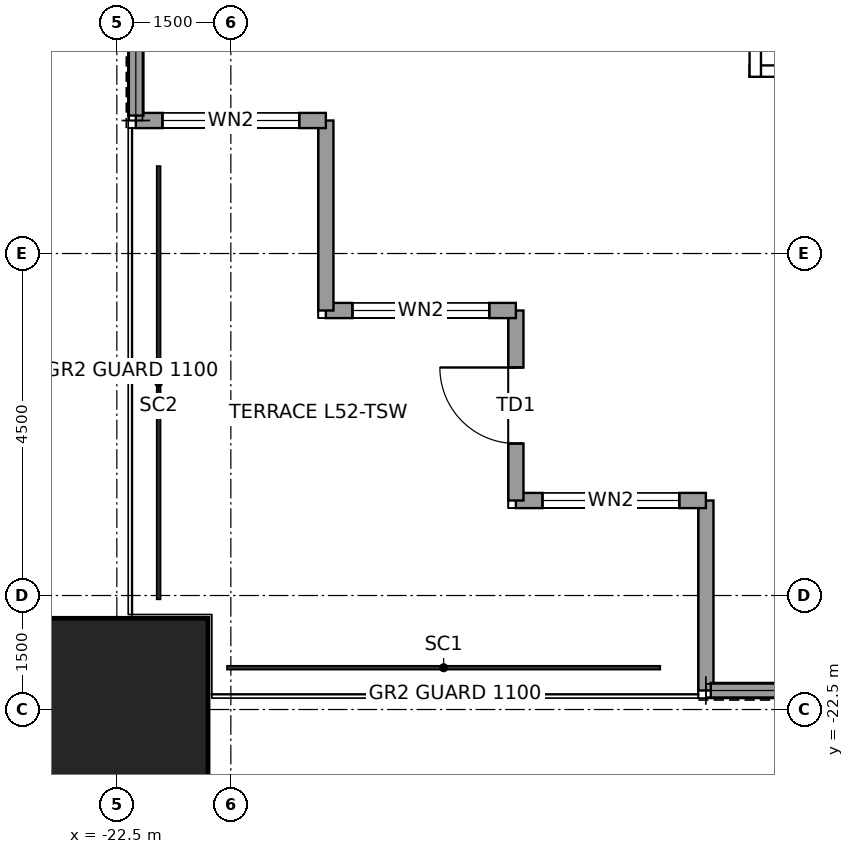
"""IFC4 building model, lengths in metres.
Left out: names, types, materials, properties, quantities, classifications, styles, units other than length and angle.
Written with IfcOpenShell. Run it as: python <this file> out.ifc"""

import sys

from ifc_helpers import new_model, si_unit, direction, frame, frame_2d, origin, origin_2d, place, context, subcontext, project, spatial, rectangle, hollow_rectangle, extrude, element, fill, save


model = new_model("IFC4")
c1 = context("Model", 3, precision=1e-05, world=origin(), true_north=direction((0.0, 1.0)))
c2 = subcontext(c1, "Body", "Model", "MODEL_VIEW")
j1 = project(units=[si_unit("LENGTHUNIT", "METRE"), si_unit("PLANEANGLEUNIT", "RADIAN")], contexts=[c1])
p1 = place(None, origin())
s1 = spatial("IfcSite", under=j1, at=p1, CompositionType="ELEMENT")
p2 = place(p1, origin())
s2 = spatial("IfcBuilding", under=s1, at=p2, CompositionType="ELEMENT")
p3 = place(p2, frame((0.0, 0.0, 241.9)))
s3 = spatial("IfcBuildingStorey", under=s2, at=p3, CompositionType="ELEMENT", Elevation=241.9)
p4 = place(p3, frame((-22.5, -22.5, 0.0), z_axis=(0.0, 0.0, 1.0), x_axis=(1.0, 0.0, 0.0)))
e1 = element("IfcColumn", 1, at=p4, inside=s3, PredefinedType="COLUMN", context=c2, shape_type="SweptSolid", body=[
    extrude(hollow_rectangle(XDim=2.4, YDim=2.4, WallThickness=0.12, at=origin_2d()), origin(), (0.0, 0.0, 1.0), 4.0),
])
p5 = place(p3, frame((-14.75, -22.25, 0.0), z_axis=(0.0, 0.0, 1.0), x_axis=(0.0, 1.0, 0.0)))
e2 = element("IfcWall", 2, at=p5, inside=s3, PredefinedType="SOLIDWALL", context=c2, shape_type="SweptSolid", body=[
    extrude(rectangle(XDim=2.5, YDim=0.2, at=frame_2d((1.25, 0.0))), origin(), (0.0, 0.0, 1.0), 3.85),
])
p6 = place(p3, frame((-14.75, -19.75, 0.0), z_axis=(0.0, 0.0, 1.0), x_axis=(-1.0, 0.0, 0.0)))
e3 = element("IfcWall", 3, at=p6, inside=s3, PredefinedType="SOLIDWALL", context=c2, shape_type="SweptSolid", body=[
    extrude(rectangle(XDim=2.5, YDim=0.2, at=frame_2d((1.25, 0.0))), origin(), (0.0, 0.0, 1.0), 3.85),
])
p7 = place(p6, frame((0.35, 0.0, 0.3)))
e4 = element("IfcOpeningElement", 4, at=p7, cuts=e3, PredefinedType="OPENING", context=c2, shape_type="SweptSolid", body=[
    extrude(rectangle(XDim=1.8, YDim=2.4, at=frame_2d((0.9, 1.2))), frame((0.0, 0.11, 0.0), z_axis=(0.0, -1.0, 0.0), x_axis=(1.0, 0.0, 0.0)), (0.0, 0.0, 1.0), 0.22),
])
p8 = place(p3, frame((-17.25, -19.75, 0.0), z_axis=(0.0, 0.0, 1.0), x_axis=(0.0, 1.0, 0.0)))
e5 = element("IfcWall", 5, at=p8, inside=s3, PredefinedType="SOLIDWALL", context=c2, shape_type="SweptSolid", body=[
    extrude(rectangle(XDim=2.5, YDim=0.2, at=frame_2d((1.25, 0.0))), origin(), (0.0, 0.0, 1.0), 3.85),
])
p9 = place(p8, frame((0.75, 0.0, 0.0)))
e6 = element("IfcOpeningElement", 6, at=p9, cuts=e5, PredefinedType="OPENING", context=c2, shape_type="SweptSolid", body=[
    extrude(rectangle(XDim=1.0, YDim=2.4, at=frame_2d((0.5, 1.2))), frame((0.0, 0.11, 0.0), z_axis=(0.0, -1.0, 0.0), x_axis=(1.0, 0.0, 0.0)), (0.0, 0.0, 1.0), 0.22),
])
p10 = place(p3, frame((-17.25, -17.25, 0.0), z_axis=(0.0, 0.0, 1.0), x_axis=(-1.0, 0.0, 0.0)))
e7 = element("IfcWall", 7, at=p10, inside=s3, PredefinedType="SOLIDWALL", context=c2, shape_type="SweptSolid", body=[
    extrude(rectangle(XDim=2.5, YDim=0.2, at=frame_2d((1.25, 0.0))), origin(), (0.0, 0.0, 1.0), 3.85),
])
p11 = place(p10, frame((0.35, 0.0, 0.3)))
e8 = element("IfcOpeningElement", 8, at=p11, cuts=e7, PredefinedType="OPENING", context=c2, shape_type="SweptSolid", body=[
    extrude(rectangle(XDim=1.8, YDim=2.4, at=frame_2d((0.9, 1.2))), frame((0.0, 0.11, 0.0), z_axis=(0.0, -1.0, 0.0), x_axis=(1.0, 0.0, 0.0)), (0.0, 0.0, 1.0), 0.22),
])
p12 = place(p3, frame((-19.75, -17.25, 0.0), z_axis=(0.0, 0.0, 1.0), x_axis=(0.0, 1.0, 0.0)))
e9 = element("IfcWall", 9, at=p12, inside=s3, PredefinedType="SOLIDWALL", context=c2, shape_type="SweptSolid", body=[
    extrude(rectangle(XDim=2.5, YDim=0.2, at=frame_2d((1.25, 0.0))), origin(), (0.0, 0.0, 1.0), 3.85),
])
p13 = place(p3, frame((-19.75, -14.75, 0.0), z_axis=(0.0, 0.0, 1.0), x_axis=(-1.0, 0.0, 0.0)))
e10 = element("IfcWall", 10, at=p13, inside=s3, PredefinedType="SOLIDWALL", context=c2, shape_type="SweptSolid", body=[
    extrude(rectangle(XDim=2.5, YDim=0.2, at=frame_2d((1.25, 0.0))), origin(), (0.0, 0.0, 1.0), 3.85),
])
p14 = place(p13, frame((0.35, 0.0, 0.3)))
e11 = element("IfcOpeningElement", 11, at=p14, cuts=e10, PredefinedType="OPENING", context=c2, shape_type="SweptSolid", body=[
    extrude(rectangle(XDim=1.8, YDim=2.4, at=frame_2d((0.9, 1.2))), frame((0.0, 0.11, 0.0), z_axis=(0.0, -1.0, 0.0), x_axis=(1.0, 0.0, 0.0)), (0.0, 0.0, 1.0), 0.22),
])
for number, where, z_axis, x_axis in (
    (12, (-12.366, -22.25, 0.0), (0.0, 0.0, 1.0), (-1.0, 0.0, 0.0)),
    (13, (-22.25, -14.685, 0.0), (0.0, 0.0, 1.0), (0.0, 1.0, 0.0)),
):
    element("IfcWall", number, at=place(p3, frame(where, z_axis=z_axis, x_axis=x_axis)), inside=s3, PredefinedType="SOLIDWALL", context=c2, shape_type="SweptSolid", body=[
        extrude(rectangle(XDim=2.319, YDim=0.2, at=frame_2d((1.16, 0.0))), origin(), (0.0, 0.0, 1.0), 3.85),
    ])
p15 = place(p3, frame((-14.175, -14.1, 0.0), z_axis=(0.0, 0.0, 1.0), x_axis=(1.0, 0.0, 0.0)))
e14 = element("IfcWall", 14, at=p15, inside=s3, PredefinedType="PARTITIONING", context=c2, shape_type="SweptSolid", body=[
    extrude(rectangle(XDim=4.333, YDim=0.15, at=frame_2d((2.167, 0.0))), origin(), (0.0, 0.0, 1.0), 3.85),
])
p16 = place(p3, frame((-14.1, -14.175, 0.0), z_axis=(0.0, 0.0, 1.0), x_axis=(0.0, 1.0, 0.0)))
e15 = element("IfcWall", 15, at=p16, inside=s3, PredefinedType="PARTITIONING", context=c2, shape_type="SweptSolid", body=[
    extrude(rectangle(XDim=26.25, YDim=0.15, at=frame_2d((13.125, 0.0))), origin(), (0.0, 0.0, 1.0), 3.85),
])
p17 = place(p16, frame((4.125, 0.0, 0.0)))
e16 = element("IfcOpeningElement", 16, at=p17, cuts=e15, PredefinedType="OPENING", context=c2, shape_type="SweptSolid", body=[
    extrude(rectangle(XDim=1.0, YDim=2.4, at=frame_2d((0.5, 1.2))), frame((0.0, 0.085, 0.0), z_axis=(0.0, -1.0, 0.0), x_axis=(1.0, 0.0, 0.0)), (0.0, 0.0, 1.0), 0.17),
])
p18 = place(p7, origin())
e17 = element("IfcWindow", 17, at=p18, inside=s3, PartitioningType="SINGLE_PANEL", PredefinedType="WINDOW", context=c2, shape_type="SweptSolid", body=[
    extrude(rectangle(XDim=1.8, YDim=2.4, at=frame_2d((0.9, 1.2))), frame((0.0, 0.03, 0.0), z_axis=(0.0, -1.0, 0.0), x_axis=(1.0, 0.0, 0.0)), (0.0, 0.0, 1.0), 0.06),
])
fill(e4, e17)
p19 = place(p9, origin())
e18 = element("IfcDoor", 18, at=p19, inside=s3, OperationType="SINGLE_SWING_RIGHT", PredefinedType="DOOR", context=c2, shape_type="SweptSolid", body=[
    extrude(rectangle(XDim=1.0, YDim=2.4, at=frame_2d((0.5, 1.2))), frame((0.0, 0.025, 0.0), z_axis=(0.0, -1.0, 0.0), x_axis=(1.0, 0.0, 0.0)), (0.0, 0.0, 1.0), 0.05),
])
fill(e6, e18)
p20 = place(p11, origin())
e19 = element("IfcWindow", 19, at=p20, inside=s3, PartitioningType="SINGLE_PANEL", PredefinedType="WINDOW", context=c2, shape_type="SweptSolid", body=[
    extrude(rectangle(XDim=1.8, YDim=2.4, at=frame_2d((0.9, 1.2))), frame((0.0, 0.03, 0.0), z_axis=(0.0, -1.0, 0.0), x_axis=(1.0, 0.0, 0.0)), (0.0, 0.0, 1.0), 0.06),
])
fill(e8, e19)
p21 = place(p14, origin())
e20 = element("IfcWindow", 20, at=p21, inside=s3, PartitioningType="SINGLE_PANEL", PredefinedType="WINDOW", context=c2, shape_type="SweptSolid", body=[
    extrude(rectangle(XDim=1.8, YDim=2.4, at=frame_2d((0.9, 1.2))), frame((0.0, 0.03, 0.0), z_axis=(0.0, -1.0, 0.0), x_axis=(1.0, 0.0, 0.0)), (0.0, 0.0, 1.0), 0.06),
])
fill(e11, e20)
save(model, sys.argv[1])
